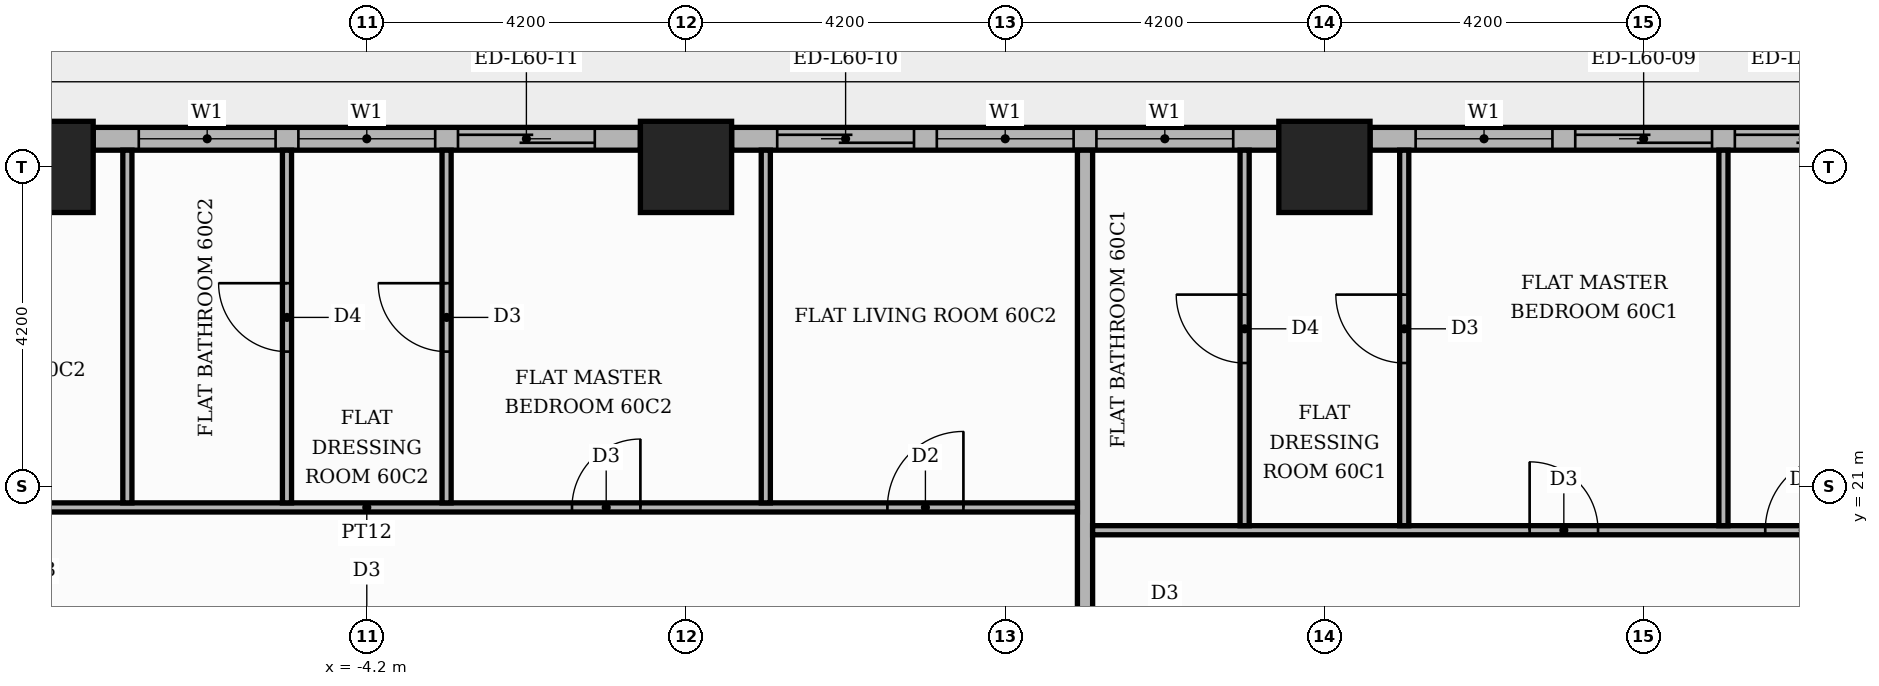
"""IFC4 building model, lengths in metres.
Left out: names, types, materials, properties, quantities, classifications, styles, units other than length and angle.
Written with IfcOpenShell. Run it as: python <this file> out.ifc"""

import sys

from ifc_helpers import new_model, si_unit, direction, frame, frame_2d, origin, origin_2d, place, context, subcontext, project, spatial, rectangle, extrude, element, fill, save


model = new_model("IFC4")
c1 = context("Model", 3, precision=1e-05, world=origin(), true_north=direction((0.0, 1.0)))
c2 = subcontext(c1, "Body", "Model", "MODEL_VIEW")
j1 = project(units=[si_unit("LENGTHUNIT", "METRE"), si_unit("PLANEANGLEUNIT", "RADIAN")], contexts=[c1])
p1 = place(None, origin())
s1 = spatial("IfcSite", under=j1, at=p1, CompositionType="ELEMENT")
p2 = place(p1, origin())
s2 = spatial("IfcBuilding", under=s1, at=p2, CompositionType="ELEMENT")
p3 = place(p2, frame((0.0, 0.0, 252.3)))
s3 = spatial("IfcBuildingStorey", under=s2, at=p3, CompositionType="ELEMENT", Elevation=252.3)
for number, where, z_axis, x_axis in (
    (1, (0.0, 25.2, 0.0), (0.0, 0.0, 1.0), (1.0, 0.0, 0.0)),
    (2, (-8.4, 25.2, 0.0), (0.0, 0.0, 1.0), (1.0, 0.0, 0.0)),
    (3, (8.4, 25.2, 0.0), (0.0, 0.0, 1.0), (1.0, 0.0, 0.0)),
):
    element("IfcColumn", number, at=place(p3, frame(where, z_axis=z_axis, x_axis=x_axis)), inside=s3, PredefinedType="COLUMN", context=c2, shape_type="SweptSolid", body=[
        extrude(rectangle(XDim=1.2, YDim=1.2, at=origin_2d()), origin(), (0.0, 0.0, 1.0), 3.9),
    ])
p4 = place(p3, frame((16.2, 25.57, 0.0), z_axis=(0.0, 0.0, 1.0), x_axis=(-1.0, 0.0, 0.0)))
e4 = element("IfcWall", 4, at=p4, inside=s3, PredefinedType="STANDARD", context=c2, shape_type="SweptSolid", body=[
    extrude(rectangle(XDim=7.2, YDim=0.3, at=frame_2d((3.6, 0.0))), origin(), (0.0, 0.0, 1.0), 3.48),
])
p5 = place(p4, frame((0.6, 0.0, 0.0)))
e5 = element("IfcOpeningElement", 5, at=p5, cuts=e4, PredefinedType="OPENING", context=c2, shape_type="SweptSolid", body=[
    extrude(rectangle(XDim=1.8, YDim=2.4, at=frame_2d((0.9, 1.2))), frame((0.0, 0.16, 0.0), z_axis=(0.0, -1.0, 0.0), x_axis=(1.0, 0.0, 0.0)), (0.0, 0.0, 1.0), 0.32),
])
p6 = place(p4, frame((2.7, 0.0, 0.0)))
e6 = element("IfcOpeningElement", 6, at=p6, cuts=e4, PredefinedType="OPENING", context=c2, shape_type="SweptSolid", body=[
    extrude(rectangle(XDim=1.8, YDim=2.4, at=frame_2d((0.9, 1.2))), frame((0.0, 0.16, 0.0), z_axis=(0.0, -1.0, 0.0), x_axis=(1.0, 0.0, 0.0)), (0.0, 0.0, 1.0), 0.32),
])
p7 = place(p4, frame((4.8, 0.0, 0.9)))
e7 = element("IfcOpeningElement", 7, at=p7, cuts=e4, PredefinedType="OPENING", context=c2, shape_type="SweptSolid", body=[
    extrude(rectangle(XDim=1.8, YDim=2.1, at=frame_2d((0.9, 1.05))), frame((0.0, 0.16, 0.0), z_axis=(0.0, -1.0, 0.0), x_axis=(1.0, 0.0, 0.0)), (0.0, 0.0, 1.0), 0.32),
])
p8 = place(p3, frame((7.8, 25.57, 0.0), z_axis=(0.0, 0.0, 1.0), x_axis=(-1.0, 0.0, 0.0)))
e8 = element("IfcWall", 8, at=p8, inside=s3, PredefinedType="STANDARD", context=c2, shape_type="SweptSolid", body=[
    extrude(rectangle(XDim=7.2, YDim=0.3, at=frame_2d((3.6, 0.0))), origin(), (0.0, 0.0, 1.0), 3.48),
])
p9 = place(p8, frame((0.6, 0.0, 0.9)))
e9 = element("IfcOpeningElement", 9, at=p9, cuts=e8, PredefinedType="OPENING", context=c2, shape_type="SweptSolid", body=[
    extrude(rectangle(XDim=1.8, YDim=2.1, at=frame_2d((0.9, 1.05))), frame((0.0, 0.16, 0.0), z_axis=(0.0, -1.0, 0.0), x_axis=(1.0, 0.0, 0.0)), (0.0, 0.0, 1.0), 0.32),
])
p10 = place(p8, frame((2.7, 0.0, 0.9)))
e10 = element("IfcOpeningElement", 10, at=p10, cuts=e8, PredefinedType="OPENING", context=c2, shape_type="SweptSolid", body=[
    extrude(rectangle(XDim=1.8, YDim=2.1, at=frame_2d((0.9, 1.05))), frame((0.0, 0.16, 0.0), z_axis=(0.0, -1.0, 0.0), x_axis=(1.0, 0.0, 0.0)), (0.0, 0.0, 1.0), 0.32),
])
p11 = place(p8, frame((4.8, 0.0, 0.0)))
e11 = element("IfcOpeningElement", 11, at=p11, cuts=e8, PredefinedType="OPENING", context=c2, shape_type="SweptSolid", body=[
    extrude(rectangle(XDim=1.8, YDim=2.4, at=frame_2d((0.9, 1.2))), frame((0.0, 0.16, 0.0), z_axis=(0.0, -1.0, 0.0), x_axis=(1.0, 0.0, 0.0)), (0.0, 0.0, 1.0), 0.32),
])
p12 = place(p3, frame((-0.6, 25.57, 0.0), z_axis=(0.0, 0.0, 1.0), x_axis=(-1.0, 0.0, 0.0)))
e12 = element("IfcWall", 12, at=p12, inside=s3, PredefinedType="STANDARD", context=c2, shape_type="SweptSolid", body=[
    extrude(rectangle(XDim=7.2, YDim=0.3, at=frame_2d((3.6, 0.0))), origin(), (0.0, 0.0, 1.0), 3.48),
])
p13 = place(p12, frame((0.6, 0.0, 0.0)))
e13 = element("IfcOpeningElement", 13, at=p13, cuts=e12, PredefinedType="OPENING", context=c2, shape_type="SweptSolid", body=[
    extrude(rectangle(XDim=1.8, YDim=2.4, at=frame_2d((0.9, 1.2))), frame((0.0, 0.16, 0.0), z_axis=(0.0, -1.0, 0.0), x_axis=(1.0, 0.0, 0.0)), (0.0, 0.0, 1.0), 0.32),
])
p14 = place(p12, frame((2.7, 0.0, 0.9)))
e14 = element("IfcOpeningElement", 14, at=p14, cuts=e12, PredefinedType="OPENING", context=c2, shape_type="SweptSolid", body=[
    extrude(rectangle(XDim=1.8, YDim=2.1, at=frame_2d((0.9, 1.05))), frame((0.0, 0.16, 0.0), z_axis=(0.0, -1.0, 0.0), x_axis=(1.0, 0.0, 0.0)), (0.0, 0.0, 1.0), 0.32),
])
p15 = place(p12, frame((4.8, 0.0, 0.9)))
e15 = element("IfcOpeningElement", 15, at=p15, cuts=e12, PredefinedType="OPENING", context=c2, shape_type="SweptSolid", body=[
    extrude(rectangle(XDim=1.8, YDim=2.1, at=frame_2d((0.9, 1.05))), frame((0.0, 0.16, 0.0), z_axis=(0.0, -1.0, 0.0), x_axis=(1.0, 0.0, 0.0)), (0.0, 0.0, 1.0), 0.32),
])
p16 = place(p3, frame((5.25, 13.75, 0.0), z_axis=(0.0, 0.0, 1.0), x_axis=(0.0, 1.0, 0.0)))
e16 = element("IfcWall", 16, at=p16, inside=s3, PredefinedType="PARTITIONING", context=c2, shape_type="SweptSolid", body=[
    extrude(rectangle(XDim=11.67, YDim=0.2, at=frame_2d((5.835, 0.0))), origin(), (0.0, 0.0, 1.0), 3.48),
])
p17 = place(p3, frame((5.35, 20.42, 0.0), z_axis=(0.0, 0.0, 1.0), x_axis=(1.0, 0.0, 0.0)))
e17 = element("IfcWall", 17, at=p17, inside=s3, PredefinedType="PARTITIONING", context=c2, shape_type="SweptSolid", body=[
    extrude(rectangle(XDim=15.369, YDim=0.12, at=frame_2d((7.685, 0.0))), origin(), (0.0, 0.0, 1.0), 3.48),
])
p18 = place(p17, frame((8.85, 0.0, 0.0)))
e18 = element("IfcOpeningElement", 18, at=p18, cuts=e17, PredefinedType="OPENING", context=c2, shape_type="SweptSolid", body=[
    extrude(rectangle(XDim=1.0, YDim=2.1, at=frame_2d((0.5, 1.05))), frame((0.0, 0.07, 0.0), z_axis=(0.0, -1.0, 0.0), x_axis=(1.0, 0.0, 0.0)), (0.0, 0.0, 1.0), 0.14),
])
p19 = place(p17, frame((5.75, 0.0, 0.0)))
e19 = element("IfcOpeningElement", 19, at=p19, cuts=e17, PredefinedType="OPENING", context=c2, shape_type="SweptSolid", body=[
    extrude(rectangle(XDim=0.9, YDim=2.1, at=frame_2d((0.45, 1.05))), frame((0.0, 0.07, 0.0), z_axis=(0.0, -1.0, 0.0), x_axis=(1.0, 0.0, 0.0)), (0.0, 0.0, 1.0), 0.14),
])
p20 = place(p3, frame((7.35, 20.48, 0.0), z_axis=(0.0, 0.0, 1.0), x_axis=(0.0, 1.0, 0.0)))
e20 = element("IfcWall", 20, at=p20, inside=s3, PredefinedType="PARTITIONING", context=c2, shape_type="SweptSolid", body=[
    extrude(rectangle(XDim=4.94, YDim=0.12, at=frame_2d((2.47, 0.0))), origin(), (0.0, 0.0, 1.0), 3.48),
])
p21 = place(p20, frame((2.14, 0.0, 0.0)))
e21 = element("IfcOpeningElement", 21, at=p21, cuts=e20, PredefinedType="OPENING", context=c2, shape_type="SweptSolid", body=[
    extrude(rectangle(XDim=0.9, YDim=2.1, at=frame_2d((0.45, 1.05))), frame((0.0, 0.07, 0.0), z_axis=(0.0, -1.0, 0.0), x_axis=(1.0, 0.0, 0.0)), (0.0, 0.0, 1.0), 0.14),
])
p22 = place(p3, frame((9.45, 20.48, 0.0), z_axis=(0.0, 0.0, 1.0), x_axis=(0.0, 1.0, 0.0)))
e22 = element("IfcWall", 22, at=p22, inside=s3, PredefinedType="PARTITIONING", context=c2, shape_type="SweptSolid", body=[
    extrude(rectangle(XDim=4.94, YDim=0.12, at=frame_2d((2.47, 0.0))), origin(), (0.0, 0.0, 1.0), 3.48),
])
p23 = place(p22, frame((2.14, 0.0, 0.0)))
e23 = element("IfcOpeningElement", 23, at=p23, cuts=e22, PredefinedType="OPENING", context=c2, shape_type="SweptSolid", body=[
    extrude(rectangle(XDim=0.9, YDim=2.1, at=frame_2d((0.45, 1.05))), frame((0.0, 0.07, 0.0), z_axis=(0.0, -1.0, 0.0), x_axis=(1.0, 0.0, 0.0)), (0.0, 0.0, 1.0), 0.14),
])
p24 = place(p3, frame((13.65, 20.48, 0.0), z_axis=(0.0, 0.0, 1.0), x_axis=(0.0, 1.0, 0.0)))
e24 = element("IfcWall", 24, at=p24, inside=s3, PredefinedType="PARTITIONING", context=c2, shape_type="SweptSolid", body=[
    extrude(rectangle(XDim=4.94, YDim=0.12, at=frame_2d((2.47, 0.0))), origin(), (0.0, 0.0, 1.0), 3.48),
])
p25 = place(p3, frame((-13.55, 20.72, 0.0), z_axis=(0.0, 0.0, 1.0), x_axis=(1.0, 0.0, 0.0)))
e25 = element("IfcWall", 25, at=p25, inside=s3, PredefinedType="PARTITIONING", context=c2, shape_type="SweptSolid", body=[
    extrude(rectangle(XDim=18.7, YDim=0.12, at=frame_2d((9.35, 0.0))), origin(), (0.0, 0.0, 1.0), 3.48),
])
p26 = place(p25, frame((16.2, 0.0, 0.0)))
e26 = element("IfcOpeningElement", 26, at=p26, cuts=e25, PredefinedType="OPENING", context=c2, shape_type="SweptSolid", body=[
    extrude(rectangle(XDim=1.0, YDim=2.1, at=frame_2d((0.5, 1.05))), frame((0.0, 0.07, 0.0), z_axis=(0.0, -1.0, 0.0), x_axis=(1.0, 0.0, 0.0)), (0.0, 0.0, 1.0), 0.14),
])
p27 = place(p25, frame((12.05, 0.0, 0.0)))
e27 = element("IfcOpeningElement", 27, at=p27, cuts=e25, PredefinedType="OPENING", context=c2, shape_type="SweptSolid", body=[
    extrude(rectangle(XDim=0.9, YDim=2.1, at=frame_2d((0.45, 1.05))), frame((0.0, 0.07, 0.0), z_axis=(0.0, -1.0, 0.0), x_axis=(1.0, 0.0, 0.0)), (0.0, 0.0, 1.0), 0.14),
])
p28 = place(p25, frame((3.65, 0.0, 0.0)))
e28 = element("IfcOpeningElement", 28, at=p28, cuts=e25, PredefinedType="OPENING", context=c2, shape_type="SweptSolid", body=[
    extrude(rectangle(XDim=0.9, YDim=2.1, at=frame_2d((0.45, 1.05))), frame((0.0, 0.07, 0.0), z_axis=(0.0, -1.0, 0.0), x_axis=(1.0, 0.0, 0.0)), (0.0, 0.0, 1.0), 0.14),
])
p29 = place(p3, frame((-7.35, 20.78, 0.0), z_axis=(0.0, 0.0, 1.0), x_axis=(0.0, 1.0, 0.0)))
e29 = element("IfcWall", 29, at=p29, inside=s3, PredefinedType="PARTITIONING", context=c2, shape_type="SweptSolid", body=[
    extrude(rectangle(XDim=4.64, YDim=0.12, at=frame_2d((2.32, 0.0))), origin(), (0.0, 0.0, 1.0), 3.48),
])
p30 = place(p3, frame((-5.25, 20.78, 0.0), z_axis=(0.0, 0.0, 1.0), x_axis=(0.0, 1.0, 0.0)))
e30 = element("IfcWall", 30, at=p30, inside=s3, PredefinedType="PARTITIONING", context=c2, shape_type="SweptSolid", body=[
    extrude(rectangle(XDim=4.64, YDim=0.12, at=frame_2d((2.32, 0.0))), origin(), (0.0, 0.0, 1.0), 3.48),
])
p31 = place(p30, frame((1.99, 0.0, 0.0)))
e31 = element("IfcOpeningElement", 31, at=p31, cuts=e30, PredefinedType="OPENING", context=c2, shape_type="SweptSolid", body=[
    extrude(rectangle(XDim=0.9, YDim=2.1, at=frame_2d((0.45, 1.05))), frame((0.0, 0.07, 0.0), z_axis=(0.0, -1.0, 0.0), x_axis=(1.0, 0.0, 0.0)), (0.0, 0.0, 1.0), 0.14),
])
p32 = place(p3, frame((-3.15, 20.78, 0.0), z_axis=(0.0, 0.0, 1.0), x_axis=(0.0, 1.0, 0.0)))
e32 = element("IfcWall", 32, at=p32, inside=s3, PredefinedType="PARTITIONING", context=c2, shape_type="SweptSolid", body=[
    extrude(rectangle(XDim=4.64, YDim=0.12, at=frame_2d((2.32, 0.0))), origin(), (0.0, 0.0, 1.0), 3.48),
])
p33 = place(p32, frame((1.99, 0.0, 0.0)))
e33 = element("IfcOpeningElement", 33, at=p33, cuts=e32, PredefinedType="OPENING", context=c2, shape_type="SweptSolid", body=[
    extrude(rectangle(XDim=0.9, YDim=2.1, at=frame_2d((0.45, 1.05))), frame((0.0, 0.07, 0.0), z_axis=(0.0, -1.0, 0.0), x_axis=(1.0, 0.0, 0.0)), (0.0, 0.0, 1.0), 0.14),
])
p34 = place(p3, frame((1.05, 20.78, 0.0), z_axis=(0.0, 0.0, 1.0), x_axis=(0.0, 1.0, 0.0)))
e34 = element("IfcWall", 34, at=p34, inside=s3, PredefinedType="PARTITIONING", context=c2, shape_type="SweptSolid", body=[
    extrude(rectangle(XDim=4.64, YDim=0.12, at=frame_2d((2.32, 0.0))), origin(), (0.0, 0.0, 1.0), 3.48),
])
p35 = place(p5, origin())
e35 = element("IfcDoor", 35, at=p35, inside=s3, OperationType="SLIDING_TO_LEFT", PredefinedType="DOOR", context=c2, shape_type="SweptSolid", body=[
    extrude(rectangle(XDim=1.8, YDim=2.4, at=frame_2d((0.9, 1.2))), frame((0.0, 0.025, 0.0), z_axis=(0.0, -1.0, 0.0), x_axis=(1.0, 0.0, 0.0)), (0.0, 0.0, 1.0), 0.05),
])
fill(e5, e35)
p36 = place(p6, origin())
e36 = element("IfcDoor", 36, at=p36, inside=s3, OperationType="SLIDING_TO_RIGHT", PredefinedType="DOOR", context=c2, shape_type="SweptSolid", body=[
    extrude(rectangle(XDim=1.8, YDim=2.4, at=frame_2d((0.9, 1.2))), frame((0.0, 0.025, 0.0), z_axis=(0.0, -1.0, 0.0), x_axis=(1.0, 0.0, 0.0)), (0.0, 0.0, 1.0), 0.05),
])
fill(e6, e36)
p37 = place(p7, origin())
e37 = element("IfcWindow", 37, at=p37, inside=s3, PartitioningType="SINGLE_PANEL", PredefinedType="WINDOW", context=c2, shape_type="SweptSolid", body=[
    extrude(rectangle(XDim=1.8, YDim=2.1, at=frame_2d((0.9, 1.05))), frame((0.0, 0.03, 0.0), z_axis=(0.0, -1.0, 0.0), x_axis=(1.0, 0.0, 0.0)), (0.0, 0.0, 1.0), 0.06),
])
fill(e7, e37)
p38 = place(p9, origin())
e38 = element("IfcWindow", 38, at=p38, inside=s3, PartitioningType="SINGLE_PANEL", PredefinedType="WINDOW", context=c2, shape_type="SweptSolid", body=[
    extrude(rectangle(XDim=1.8, YDim=2.1, at=frame_2d((0.9, 1.05))), frame((0.0, 0.03, 0.0), z_axis=(0.0, -1.0, 0.0), x_axis=(1.0, 0.0, 0.0)), (0.0, 0.0, 1.0), 0.06),
])
fill(e9, e38)
p39 = place(p10, origin())
e39 = element("IfcWindow", 39, at=p39, inside=s3, PartitioningType="SINGLE_PANEL", PredefinedType="WINDOW", context=c2, shape_type="SweptSolid", body=[
    extrude(rectangle(XDim=1.8, YDim=2.1, at=frame_2d((0.9, 1.05))), frame((0.0, 0.03, 0.0), z_axis=(0.0, -1.0, 0.0), x_axis=(1.0, 0.0, 0.0)), (0.0, 0.0, 1.0), 0.06),
])
fill(e10, e39)
p40 = place(p11, origin())
e40 = element("IfcDoor", 40, at=p40, inside=s3, OperationType="SLIDING_TO_RIGHT", PredefinedType="DOOR", context=c2, shape_type="SweptSolid", body=[
    extrude(rectangle(XDim=1.8, YDim=2.4, at=frame_2d((0.9, 1.2))), frame((0.0, 0.025, 0.0), z_axis=(0.0, -1.0, 0.0), x_axis=(1.0, 0.0, 0.0)), (0.0, 0.0, 1.0), 0.05),
])
fill(e11, e40)
p41 = place(p13, origin())
e41 = element("IfcDoor", 41, at=p41, inside=s3, OperationType="SLIDING_TO_LEFT", PredefinedType="DOOR", context=c2, shape_type="SweptSolid", body=[
    extrude(rectangle(XDim=1.8, YDim=2.4, at=frame_2d((0.9, 1.2))), frame((0.0, 0.025, 0.0), z_axis=(0.0, -1.0, 0.0), x_axis=(1.0, 0.0, 0.0)), (0.0, 0.0, 1.0), 0.05),
])
fill(e13, e41)
p42 = place(p14, origin())
e42 = element("IfcWindow", 42, at=p42, inside=s3, PartitioningType="SINGLE_PANEL", PredefinedType="WINDOW", context=c2, shape_type="SweptSolid", body=[
    extrude(rectangle(XDim=1.8, YDim=2.1, at=frame_2d((0.9, 1.05))), frame((0.0, 0.03, 0.0), z_axis=(0.0, -1.0, 0.0), x_axis=(1.0, 0.0, 0.0)), (0.0, 0.0, 1.0), 0.06),
])
fill(e14, e42)
p43 = place(p15, origin())
e43 = element("IfcWindow", 43, at=p43, inside=s3, PartitioningType="SINGLE_PANEL", PredefinedType="WINDOW", context=c2, shape_type="SweptSolid", body=[
    extrude(rectangle(XDim=1.8, YDim=2.1, at=frame_2d((0.9, 1.05))), frame((0.0, 0.03, 0.0), z_axis=(0.0, -1.0, 0.0), x_axis=(1.0, 0.0, 0.0)), (0.0, 0.0, 1.0), 0.06),
])
fill(e15, e43)
p44 = place(p18, origin())
e44 = element("IfcDoor", 44, at=p44, inside=s3, OperationType="SINGLE_SWING_RIGHT", PredefinedType="DOOR", context=c2, shape_type="SweptSolid", body=[
    extrude(rectangle(XDim=1.0, YDim=2.1, at=frame_2d((0.5, 1.05))), frame((0.0, 0.025, 0.0), z_axis=(0.0, -1.0, 0.0), x_axis=(1.0, 0.0, 0.0)), (0.0, 0.0, 1.0), 0.05),
])
fill(e18, e44)
p45 = place(p19, origin())
e45 = element("IfcDoor", 45, at=p45, inside=s3, OperationType="SINGLE_SWING_LEFT", PredefinedType="DOOR", context=c2, shape_type="SweptSolid", body=[
    extrude(rectangle(XDim=0.9, YDim=2.1, at=frame_2d((0.45, 1.05))), frame((0.0, 0.025, 0.0), z_axis=(0.0, -1.0, 0.0), x_axis=(1.0, 0.0, 0.0)), (0.0, 0.0, 1.0), 0.05),
])
fill(e19, e45)
p46 = place(p23, origin())
e46 = element("IfcDoor", 46, at=p46, inside=s3, OperationType="SINGLE_SWING_RIGHT", PredefinedType="DOOR", context=c2, shape_type="SweptSolid", body=[
    extrude(rectangle(XDim=0.9, YDim=2.1, at=frame_2d((0.45, 1.05))), frame((0.0, 0.025, 0.0), z_axis=(0.0, -1.0, 0.0), x_axis=(1.0, 0.0, 0.0)), (0.0, 0.0, 1.0), 0.05),
])
fill(e23, e46)
p47 = place(p21, origin())
e47 = element("IfcDoor", 47, at=p47, inside=s3, OperationType="SINGLE_SWING_RIGHT", PredefinedType="DOOR", context=c2, shape_type="SweptSolid", body=[
    extrude(rectangle(XDim=0.9, YDim=2.1, at=frame_2d((0.45, 1.05))), frame((0.0, 0.025, 0.0), z_axis=(0.0, -1.0, 0.0), x_axis=(1.0, 0.0, 0.0)), (0.0, 0.0, 1.0), 0.05),
])
fill(e21, e47)
p48 = place(p26, origin())
e48 = element("IfcDoor", 48, at=p48, inside=s3, OperationType="SINGLE_SWING_RIGHT", PredefinedType="DOOR", context=c2, shape_type="SweptSolid", body=[
    extrude(rectangle(XDim=1.0, YDim=2.1, at=frame_2d((0.5, 1.05))), frame((0.0, 0.025, 0.0), z_axis=(0.0, -1.0, 0.0), x_axis=(1.0, 0.0, 0.0)), (0.0, 0.0, 1.0), 0.05),
])
fill(e26, e48)
p49 = place(p27, origin())
e49 = element("IfcDoor", 49, at=p49, inside=s3, OperationType="SINGLE_SWING_RIGHT", PredefinedType="DOOR", context=c2, shape_type="SweptSolid", body=[
    extrude(rectangle(XDim=0.9, YDim=2.1, at=frame_2d((0.45, 1.05))), frame((0.0, 0.025, 0.0), z_axis=(0.0, -1.0, 0.0), x_axis=(1.0, 0.0, 0.0)), (0.0, 0.0, 1.0), 0.05),
])
fill(e27, e49)
p50 = place(p33, origin())
e50 = element("IfcDoor", 50, at=p50, inside=s3, OperationType="SINGLE_SWING_RIGHT", PredefinedType="DOOR", context=c2, shape_type="SweptSolid", body=[
    extrude(rectangle(XDim=0.9, YDim=2.1, at=frame_2d((0.45, 1.05))), frame((0.0, 0.025, 0.0), z_axis=(0.0, -1.0, 0.0), x_axis=(1.0, 0.0, 0.0)), (0.0, 0.0, 1.0), 0.05),
])
fill(e33, e50)
p51 = place(p31, origin())
e51 = element("IfcDoor", 51, at=p51, inside=s3, OperationType="SINGLE_SWING_RIGHT", PredefinedType="DOOR", context=c2, shape_type="SweptSolid", body=[
    extrude(rectangle(XDim=0.9, YDim=2.1, at=frame_2d((0.45, 1.05))), frame((0.0, 0.025, 0.0), z_axis=(0.0, -1.0, 0.0), x_axis=(1.0, 0.0, 0.0)), (0.0, 0.0, 1.0), 0.05),
])
fill(e31, e51)
save(model, sys.argv[1])
